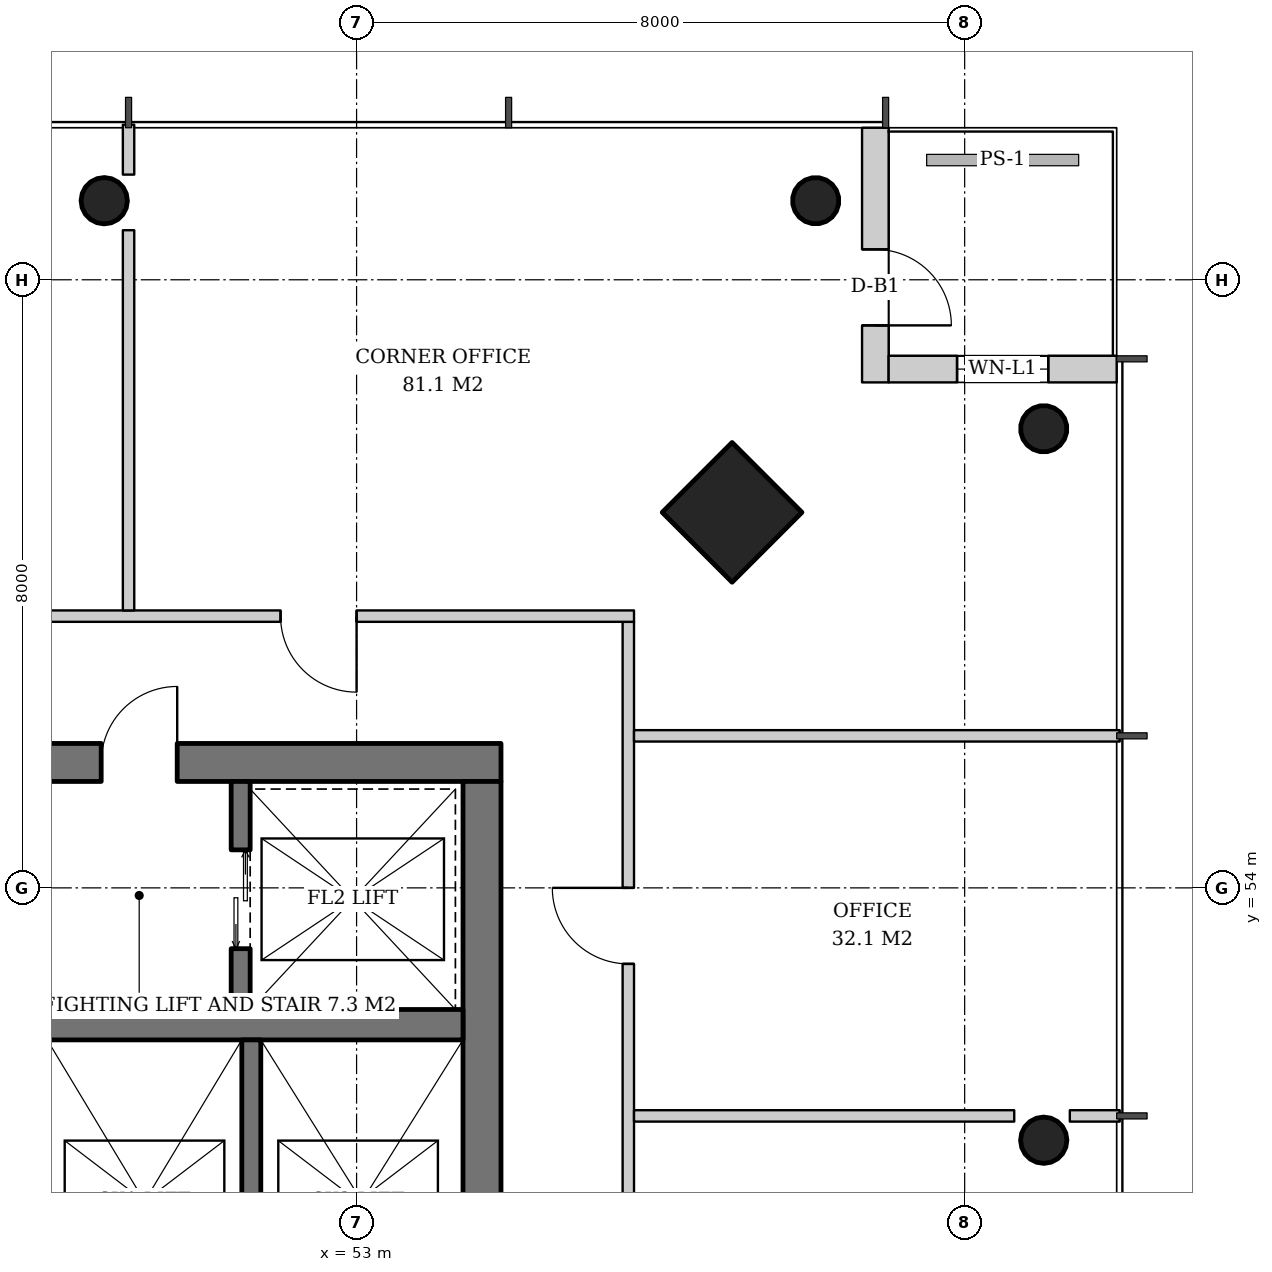
"""IFC4 building model, lengths in metres.
Left out: names, types, materials, properties, quantities, classifications, styles, units other than length and angle.
Written with IfcOpenShell. Run it as: python <this file> out.ifc"""

import sys

from ifc_helpers import new_model, si_unit, direction, frame, frame_2d, origin, origin_2d, place, context, subcontext, project, spatial, rectangle, hollow_circle, extrude, element, fill, save


model = new_model("IFC4")
c1 = context("Model", 3, precision=1e-05, world=origin(), true_north=direction((0.0, 1.0)))
c2 = subcontext(c1, "Body", "Model", "MODEL_VIEW")
j1 = project(units=[si_unit("LENGTHUNIT", "METRE"), si_unit("PLANEANGLEUNIT", "RADIAN")], contexts=[c1])
p1 = place(None, origin())
s1 = spatial("IfcSite", under=j1, at=p1, CompositionType="ELEMENT")
p2 = place(p1, origin())
s2 = spatial("IfcBuilding", under=s1, at=p2, CompositionType="ELEMENT")
p3 = place(p2, frame((0.0, 0.0, 237.6)))
s3 = spatial("IfcBuildingStorey", under=s2, at=p3, CompositionType="ELEMENT", Elevation=237.6)
p4 = place(p3, frame((57.979, 58.979, 0.0), z_axis=(-0.031900153262, -0.031900153262, 0.998981861919), x_axis=(0.707106781187, -0.707106781187, 0.0)))
e1 = element("IfcColumn", 1, at=p4, inside=s3, PredefinedType="COLUMN", context=c2, shape_type="SweptSolid", body=[
    extrude(rectangle(XDim=1.3, YDim=1.3, at=origin_2d()), origin(), (0.0, 0.0, 1.0), 3.804),
])
p5 = place(p3, frame((62.079, 60.079, 0.0), z_axis=(-0.031964207655, -0.031964207655, 0.998977766949), x_axis=(0.707106781187, -0.707106781187, 0.0)))
e2 = element("IfcColumn", 2, at=p5, inside=s3, PredefinedType="COLUMN", context=c2, shape_type="SweptSolid", body=[
    extrude(hollow_circle(Radius=0.305, WallThickness=0.025, at=origin_2d()), origin(), (0.0, 0.0, 1.0), 3.804),
])
p6 = place(p3, frame((62.079, 50.693, 0.0), z_axis=(-0.031978732291, -0.01065957743, 0.999431705566), x_axis=(0.316227766017, -0.948683298051, 0.0)))
e3 = element("IfcColumn", 3, at=p6, inside=s3, PredefinedType="COLUMN", context=c2, shape_type="SweptSolid", body=[
    extrude(hollow_circle(Radius=0.305, WallThickness=0.025, at=origin_2d()), origin(), (0.0, 0.0, 1.0), 3.802),
])
p7 = place(p3, frame((59.079, 63.079, 0.0), z_axis=(-0.031964207655, -0.031964207655, 0.998977766949), x_axis=(0.707106781187, -0.707106781187, 0.0)))
e4 = element("IfcColumn", 4, at=p7, inside=s3, PredefinedType="COLUMN", context=c2, shape_type="SweptSolid", body=[
    extrude(hollow_circle(Radius=0.305, WallThickness=0.025, at=origin_2d()), origin(), (0.0, 0.0, 1.0), 3.804),
])
p8 = place(p3, frame((49.693, 63.079, 0.0), z_axis=(-0.01065957743, -0.031978732291, 0.999431705566), x_axis=(0.948683298051, -0.316227766017, 0.0)))
e5 = element("IfcColumn", 5, at=p8, inside=s3, PredefinedType="COLUMN", context=c2, shape_type="SweptSolid", body=[
    extrude(hollow_circle(Radius=0.305, WallThickness=0.025, at=origin_2d()), origin(), (0.0, 0.0, 1.0), 3.802),
])
p9 = place(p3, frame((35.1, 55.65, 0.0), z_axis=(0.0, 0.0, 1.0), x_axis=(1.0, 0.0, 0.0)))
e6 = element("IfcWall", 6, at=p9, inside=s3, PredefinedType="SHEAR", context=c2, shape_type="SweptSolid", body=[
    extrude(rectangle(XDim=19.8, YDim=0.5, at=frame_2d((9.9, 0.0))), origin(), (0.0, 0.0, 1.0), 3.8),
])
p10 = place(p9, frame((14.54, 0.0, 0.0)))
e7 = element("IfcOpeningElement", 7, at=p10, cuts=e6, PredefinedType="OPENING", context=c2, shape_type="SweptSolid", body=[
    extrude(rectangle(XDim=1.0, YDim=2.1, at=frame_2d((0.5, 1.05))), frame((0.0, 0.26, 0.0), z_axis=(0.0, -1.0, 0.0), x_axis=(1.0, 0.0, 0.0)), (0.0, 0.0, 1.0), 0.52),
])
p11 = place(p9, frame((1.625, 0.0, 0.0)))
e8 = element("IfcOpeningElement", 8, at=p11, cuts=e6, PredefinedType="OPENING", context=c2, shape_type="SweptSolid", body=[
    extrude(rectangle(XDim=1.0, YDim=2.1, at=frame_2d((0.5, 1.05))), frame((0.0, 0.26, 0.0), z_axis=(0.0, -1.0, 0.0), x_axis=(1.0, 0.0, 0.0)), (0.0, 0.0, 1.0), 0.52),
])
p12 = place(p9, frame((3.562, 0.0, 0.0)))
e9 = element("IfcOpeningElement", 9, at=p12, cuts=e6, PredefinedType="OPENING", context=c2, shape_type="SweptSolid", body=[
    extrude(rectangle(XDim=1.0, YDim=2.1, at=frame_2d((0.5, 1.05))), frame((0.0, 0.26, 0.0), z_axis=(0.0, -1.0, 0.0), x_axis=(1.0, 0.0, 0.0)), (0.0, 0.0, 1.0), 0.52),
])
p13 = place(p3, frame((54.65, 36.6, 0.0), z_axis=(0.0, 0.0, 1.0), x_axis=(0.0, 1.0, 0.0)))
e10 = element("IfcWall", 10, at=p13, inside=s3, PredefinedType="SHEAR", context=c2, shape_type="SweptSolid", body=[
    extrude(rectangle(XDim=18.8, YDim=0.5, at=frame_2d((9.4, 0.0))), origin(), (0.0, 0.0, 1.0), 3.8),
])
p14 = place(p13, frame((8.5, 0.0, 0.0)))
e11 = element("IfcOpeningElement", 11, at=p14, cuts=e10, PredefinedType="OPENING", context=c2, shape_type="SweptSolid", body=[
    extrude(rectangle(XDim=1.8, YDim=2.4, at=frame_2d((0.9, 1.2))), frame((0.0, 0.26, 0.0), z_axis=(0.0, -1.0, 0.0), x_axis=(1.0, 0.0, 0.0)), (0.0, 0.0, 1.0), 0.52),
])
p15 = place(p3, frame((35.6, 52.2, 0.0), z_axis=(0.0, 0.0, 1.0), x_axis=(1.0, 0.0, 0.0)))
e12 = element("IfcWall", 12, at=p15, inside=s3, PredefinedType="SHEAR", context=c2, shape_type="SweptSolid", body=[
    extrude(rectangle(XDim=18.8, YDim=0.4, at=frame_2d((9.4, 0.0))), origin(), (0.0, 0.0, 1.0), 3.8),
])
p16 = place(p3, frame((59.825, 64.0, 0.0), z_axis=(0.0, 0.0, 1.0), x_axis=(0.0, -1.0, 0.0)))
e13 = element("IfcWall", 13, at=p16, inside=s3, PredefinedType="SOLIDWALL", context=c2, shape_type="SweptSolid", body=[
    extrude(rectangle(XDim=3.35, YDim=0.35, at=frame_2d((1.675, 0.0))), origin(), (0.0, 0.0, 1.0), 3.62),
])
p17 = place(p16, frame((1.6, 0.0, 0.0)))
e14 = element("IfcOpeningElement", 14, at=p17, cuts=e13, PredefinedType="OPENING", context=c2, shape_type="SweptSolid", body=[
    extrude(rectangle(XDim=1.0, YDim=2.4, at=frame_2d((0.5, 1.2))), frame((0.0, 0.185, 0.0), z_axis=(0.0, -1.0, 0.0), x_axis=(1.0, 0.0, 0.0)), (0.0, 0.0, 1.0), 0.37),
])
p18 = place(p3, frame((60.0, 60.825, 0.0), z_axis=(0.0, 0.0, 1.0), x_axis=(1.0, 0.0, 0.0)))
e15 = element("IfcWall", 15, at=p18, inside=s3, PredefinedType="SOLIDWALL", context=c2, shape_type="SweptSolid", body=[
    extrude(rectangle(XDim=3.0, YDim=0.35, at=frame_2d((1.5, 0.0))), origin(), (0.0, 0.0, 1.0), 3.62),
])
p19 = place(p18, frame((0.9, 0.0, 0.6)))
e16 = element("IfcOpeningElement", 16, at=p19, cuts=e15, PredefinedType="OPENING", context=c2, shape_type="SweptSolid", body=[
    extrude(rectangle(XDim=1.2, YDim=2.55, at=frame_2d((0.6, 1.275))), frame((0.0, 0.185, 0.0), z_axis=(0.0, -1.0, 0.0), x_axis=(1.0, 0.0, 0.0)), (0.0, 0.0, 1.0), 0.37),
])
p20 = place(p3, frame((51.475, 52.4, 0.0), z_axis=(0.0, 0.0, 1.0), x_axis=(0.0, 1.0, 0.0)))
e17 = element("IfcWall", 17, at=p20, inside=s3, PredefinedType="SHEAR", context=c2, shape_type="SweptSolid", body=[
    extrude(rectangle(XDim=3.0, YDim=0.25, at=frame_2d((1.5, 0.0))), origin(), (0.0, 0.0, 1.0), 3.8),
])
p21 = place(p20, frame((0.8, 0.0, 0.0)))
e18 = element("IfcOpeningElement", 18, at=p21, cuts=e17, PredefinedType="OPENING", context=c2, shape_type="SweptSolid", body=[
    extrude(rectangle(XDim=1.3, YDim=2.2, at=frame_2d((0.65, 1.1))), frame((0.0, 0.135, 0.0), z_axis=(0.0, -1.0, 0.0), x_axis=(1.0, 0.0, 0.0)), (0.0, 0.0, 1.0), 0.27),
])
p22 = place(p3, frame((51.615, 47.75, 0.0), z_axis=(0.0, 0.0, 1.0), x_axis=(0.0, 1.0, 0.0)))
e19 = element("IfcWall", 19, at=p22, inside=s3, PredefinedType="SHEAR", context=c2, shape_type="SweptSolid", body=[
    extrude(rectangle(XDim=4.25, YDim=0.25, at=frame_2d((2.125, 0.0))), origin(), (0.0, 0.0, 1.0), 3.8),
])
p23 = place(p3, frame((56.575, 34.35, 0.0), z_axis=(0.0, 0.0, 1.0), x_axis=(0.0, 1.0, 0.0)))
e20 = element("IfcWall", 20, at=p23, inside=s3, PredefinedType="PARTITIONING", context=c2, shape_type="SweptSolid", body=[
    extrude(rectangle(XDim=23.15, YDim=0.15, at=frame_2d((11.575, 0.0))), origin(), (0.0, 0.0, 1.0), 3.02),
])
p24 = place(p23, frame((3.65, 0.0, 0.0)))
e21 = element("IfcOpeningElement", 21, at=p24, cuts=e20, PredefinedType="OPENING", context=c2, shape_type="SweptSolid", body=[
    extrude(rectangle(XDim=1.0, YDim=2.1, at=frame_2d((0.5, 1.05))), frame((0.0, 0.085, 0.0), z_axis=(0.0, -1.0, 0.0), x_axis=(1.0, 0.0, 0.0)), (0.0, 0.0, 1.0), 0.17),
])
p25 = place(p23, frame((8.65, 0.0, 0.0)))
e22 = element("IfcOpeningElement", 22, at=p25, cuts=e20, PredefinedType="OPENING", context=c2, shape_type="SweptSolid", body=[
    extrude(rectangle(XDim=1.0, YDim=2.1, at=frame_2d((0.5, 1.05))), frame((0.0, 0.085, 0.0), z_axis=(0.0, -1.0, 0.0), x_axis=(1.0, 0.0, 0.0)), (0.0, 0.0, 1.0), 0.17),
])
p26 = place(p23, frame((18.65, 0.0, 0.0)))
e23 = element("IfcOpeningElement", 23, at=p26, cuts=e20, PredefinedType="OPENING", context=c2, shape_type="SweptSolid", body=[
    extrude(rectangle(XDim=1.0, YDim=2.1, at=frame_2d((0.5, 1.05))), frame((0.0, 0.085, 0.0), z_axis=(0.0, -1.0, 0.0), x_axis=(1.0, 0.0, 0.0)), (0.0, 0.0, 1.0), 0.17),
])
p27 = place(p3, frame((56.65, 51.0, 0.0), z_axis=(0.0, 0.0, 1.0), x_axis=(1.0, 0.0, 0.0)))
e24 = element("IfcWall", 24, at=p27, inside=s3, PredefinedType="PARTITIONING", context=c2, shape_type="SweptSolid", body=[
    extrude(rectangle(XDim=5.002, YDim=0.15, at=frame_2d((2.501, 0.0))), origin(), (0.0, 0.0, 1.0), 3.62),
])
p28 = place(p3, frame((62.384, 51.0, 0.0), z_axis=(0.0, 0.0, 1.0), x_axis=(1.0, 0.0, 0.0)))
e25 = element("IfcWall", 25, at=p28, inside=s3, PredefinedType="PARTITIONING", context=c2, shape_type="SweptSolid", body=[
    extrude(rectangle(XDim=0.656, YDim=0.15, at=frame_2d((0.328, 0.0))), origin(), (0.0, 0.0, 1.0), 3.62),
])
p29 = place(p3, frame((56.65, 56.0, 0.0), z_axis=(0.0, 0.0, 1.0), x_axis=(1.0, 0.0, 0.0)))
e26 = element("IfcWall", 26, at=p29, inside=s3, PredefinedType="PARTITIONING", context=c2, shape_type="SweptSolid", body=[
    extrude(rectangle(XDim=6.39, YDim=0.15, at=frame_2d((3.195, 0.0))), origin(), (0.0, 0.0, 1.0), 3.12),
])
p30 = place(p3, frame((56.65, 57.575, 0.0), z_axis=(0.0, 0.0, 1.0), x_axis=(-1.0, 0.0, 0.0)))
e27 = element("IfcWall", 27, at=p30, inside=s3, PredefinedType="PARTITIONING", context=c2, shape_type="SweptSolid", body=[
    extrude(rectangle(XDim=23.15, YDim=0.15, at=frame_2d((11.575, 0.0))), origin(), (0.0, 0.0, 1.0), 3.02),
])
p31 = place(p30, frame((3.65, 0.0, 0.0)))
e28 = element("IfcOpeningElement", 28, at=p31, cuts=e27, PredefinedType="OPENING", context=c2, shape_type="SweptSolid", body=[
    extrude(rectangle(XDim=1.0, YDim=2.1, at=frame_2d((0.5, 1.05))), frame((0.0, 0.085, 0.0), z_axis=(0.0, -1.0, 0.0), x_axis=(1.0, 0.0, 0.0)), (0.0, 0.0, 1.0), 0.17),
])
p32 = place(p30, frame((8.65, 0.0, 0.0)))
e29 = element("IfcOpeningElement", 29, at=p32, cuts=e27, PredefinedType="OPENING", context=c2, shape_type="SweptSolid", body=[
    extrude(rectangle(XDim=1.0, YDim=2.1, at=frame_2d((0.5, 1.05))), frame((0.0, 0.085, 0.0), z_axis=(0.0, -1.0, 0.0), x_axis=(1.0, 0.0, 0.0)), (0.0, 0.0, 1.0), 0.17),
])
p33 = place(p30, frame((13.65, 0.0, 0.0)))
e30 = element("IfcOpeningElement", 30, at=p33, cuts=e27, PredefinedType="OPENING", context=c2, shape_type="SweptSolid", body=[
    extrude(rectangle(XDim=1.0, YDim=2.1, at=frame_2d((0.5, 1.05))), frame((0.0, 0.085, 0.0), z_axis=(0.0, -1.0, 0.0), x_axis=(1.0, 0.0, 0.0)), (0.0, 0.0, 1.0), 0.17),
])
p34 = place(p30, frame((18.65, 0.0, 0.0)))
e31 = element("IfcOpeningElement", 31, at=p34, cuts=e27, PredefinedType="OPENING", context=c2, shape_type="SweptSolid", body=[
    extrude(rectangle(XDim=1.0, YDim=2.1, at=frame_2d((0.5, 1.05))), frame((0.0, 0.085, 0.0), z_axis=(0.0, -1.0, 0.0), x_axis=(1.0, 0.0, 0.0)), (0.0, 0.0, 1.0), 0.17),
])
p35 = place(p3, frame((50.0, 57.65, 0.0), z_axis=(0.0, 0.0, 1.0), x_axis=(0.0, 1.0, 0.0)))
e32 = element("IfcWall", 32, at=p35, inside=s3, PredefinedType="PARTITIONING", context=c2, shape_type="SweptSolid", body=[
    extrude(rectangle(XDim=5.002, YDim=0.15, at=frame_2d((2.501, 0.0))), origin(), (0.0, 0.0, 1.0), 3.62),
])
p36 = place(p3, frame((50.0, 63.384, 0.0), z_axis=(0.0, 0.0, 1.0), x_axis=(0.0, 1.0, 0.0)))
e33 = element("IfcWall", 33, at=p36, inside=s3, PredefinedType="PARTITIONING", context=c2, shape_type="SweptSolid", body=[
    extrude(rectangle(XDim=0.656, YDim=0.15, at=frame_2d((0.328, 0.0))), origin(), (0.0, 0.0, 1.0), 3.62),
])
p37 = place(p17, origin())
e34 = element("IfcDoor", 34, at=p37, inside=s3, OperationType="SINGLE_SWING_RIGHT", PredefinedType="DOOR", context=c2, shape_type="SweptSolid", body=[
    extrude(rectangle(XDim=1.0, YDim=2.4, at=frame_2d((0.5, 1.2))), frame((0.0, 0.025, 0.0), z_axis=(0.0, -1.0, 0.0), x_axis=(1.0, 0.0, 0.0)), (0.0, 0.0, 1.0), 0.05),
])
fill(e14, e34)
p38 = place(p19, origin())
e35 = element("IfcWindow", 35, at=p38, inside=s3, PartitioningType="SINGLE_PANEL", PredefinedType="WINDOW", context=c2, shape_type="SweptSolid", body=[
    extrude(rectangle(XDim=1.2, YDim=2.55, at=frame_2d((0.6, 1.275))), frame((0.0, 0.03, 0.0), z_axis=(0.0, -1.0, 0.0), x_axis=(1.0, 0.0, 0.0)), (0.0, 0.0, 1.0), 0.06),
])
fill(e16, e35)
p39 = place(p21, origin())
e36 = element("IfcDoor", 36, at=p39, inside=s3, OperationType="DOUBLE_DOOR_SLIDING", PredefinedType="DOOR", context=c2, shape_type="SweptSolid", body=[
    extrude(rectangle(XDim=1.3, YDim=2.2, at=frame_2d((0.65, 1.1))), frame((0.0, 0.025, 0.0), z_axis=(0.0, -1.0, 0.0), x_axis=(1.0, 0.0, 0.0)), (0.0, 0.0, 1.0), 0.05),
])
fill(e18, e36)
p40 = place(p10, origin())
e37 = element("IfcDoor", 37, at=p40, inside=s3, OperationType="SINGLE_SWING_RIGHT", PredefinedType="DOOR", context=c2, shape_type="SweptSolid", body=[
    extrude(rectangle(XDim=1.0, YDim=2.1, at=frame_2d((0.5, 1.05))), frame((0.0, 0.025, 0.0), z_axis=(0.0, -1.0, 0.0), x_axis=(1.0, 0.0, 0.0)), (0.0, 0.0, 1.0), 0.05),
])
fill(e7, e37)
p41 = place(p26, origin())
e38 = element("IfcDoor", 38, at=p41, inside=s3, OperationType="SINGLE_SWING_RIGHT", PredefinedType="DOOR", context=c2, shape_type="SweptSolid", body=[
    extrude(rectangle(XDim=1.0, YDim=2.1, at=frame_2d((0.5, 1.05))), frame((0.0, 0.025, 0.0), z_axis=(0.0, -1.0, 0.0), x_axis=(1.0, 0.0, 0.0)), (0.0, 0.0, 1.0), 0.05),
])
fill(e23, e38)
p42 = place(p31, origin())
e39 = element("IfcDoor", 39, at=p42, inside=s3, OperationType="SINGLE_SWING_LEFT", PredefinedType="DOOR", context=c2, shape_type="SweptSolid", body=[
    extrude(rectangle(XDim=1.0, YDim=2.1, at=frame_2d((0.5, 1.05))), frame((0.0, 0.025, 0.0), z_axis=(0.0, -1.0, 0.0), x_axis=(1.0, 0.0, 0.0)), (0.0, 0.0, 1.0), 0.05),
])
fill(e28, e39)
save(model, sys.argv[1])
